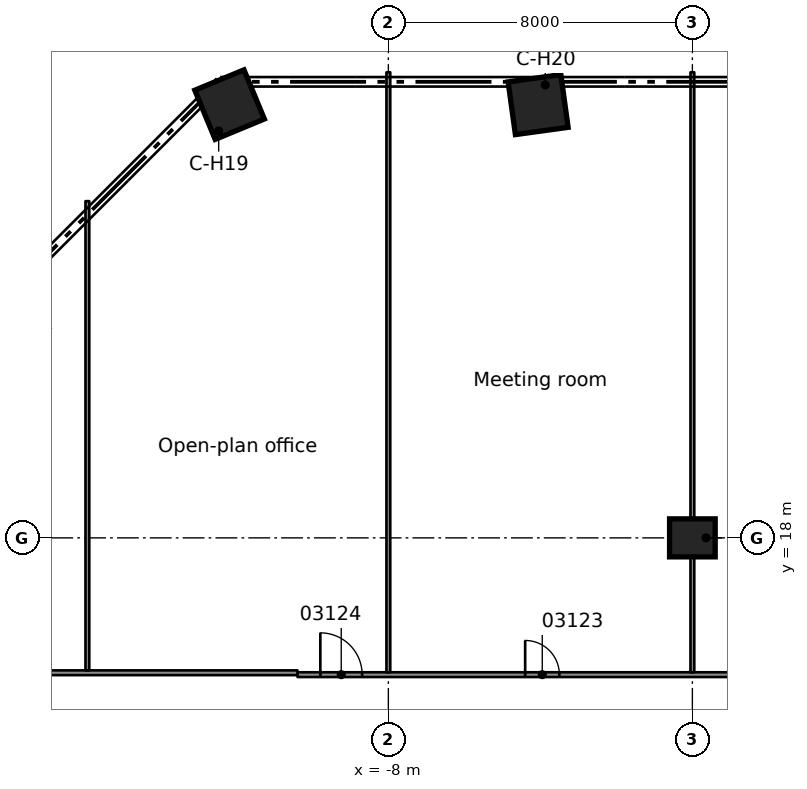
"""IFC4 building model, lengths in metres.
Left out: names, types, materials, properties, quantities, classifications, styles, units other than length and angle.
Written with IfcOpenShell. Run it as: python <this file> out.ifc"""

import sys

from ifc_helpers import new_model, si_unit, direction, frame, frame_2d, origin, origin_2d, place, context, subcontext, project, spatial, rectangle, extrude, element, fill, save


model = new_model("IFC4")
c1 = context("Model", 3, precision=1e-05, world=origin(), true_north=direction((0.0, 1.0)))
c2 = subcontext(c1, "Body", "Model", "MODEL_VIEW")
j1 = project(units=[si_unit("LENGTHUNIT", "METRE"), si_unit("PLANEANGLEUNIT", "RADIAN")], contexts=[c1])
p1 = place(None, origin())
s1 = spatial("IfcSite", under=j1, at=p1, CompositionType="ELEMENT")
p2 = place(p1, origin())
s2 = spatial("IfcBuilding", under=s1, at=p2, CompositionType="ELEMENT")
p3 = place(p2, frame((0.0, 0.0, 15.5)))
s3 = spatial("IfcBuildingStorey", under=s2, at=p3, CompositionType="ELEMENT", Elevation=15.5)
for number, where, z_axis, x_axis in (
    (1, (-12.178, 29.4, 0.0), (0.0, 0.0, 1.0), (-0.383, 0.924, 0.0)),
    (2, (-4.059, 29.4, 0.0), (0.0, 0.0, 1.0), (-0.137, 0.991, 0.0)),
):
    element("IfcColumn", number, at=place(p3, frame(where, z_axis=z_axis, x_axis=x_axis)), inside=s3, PredefinedType="COLUMN", context=c2, shape_type="SweptSolid", body=[
        extrude(rectangle(XDim=1.4, YDim=1.4, at=origin_2d()), origin(), (0.0, 0.0, 1.0), 5.0),
    ])
p4 = place(p3, frame((0.0, 18.0, 0.0), z_axis=(0.0, 0.0, 1.0), x_axis=(1.0, 0.0, 0.0)))
e3 = element("IfcColumn", 3, at=p4, inside=s3, PredefinedType="COLUMN", context=c2, shape_type="SweptSolid", body=[
    extrude(rectangle(XDim=1.2, YDim=1.0, at=origin_2d()), origin(), (0.0, 0.0, 1.0), 5.0),
])
p5 = place(p3, frame((-10.39, 14.401, 0.0), z_axis=(0.0, 0.0, 1.0), x_axis=(1.0, 0.0, 0.0)))
e4 = element("IfcWall", 4, at=p5, inside=s3, PredefinedType="PARTITIONING", context=c2, shape_type="SweptSolid", body=[
    extrude(rectangle(XDim=20.781, YDim=0.125, at=frame_2d((10.391, 0.0))), origin(), (0.0, 0.0, 1.0), 4.58),
])
p6 = place(p5, frame((18.99, 0.0, 0.0)))
e5 = element("IfcOpeningElement", 5, at=p6, cuts=e4, PredefinedType="OPENING", context=c2, shape_type="SweptSolid", body=[
    extrude(rectangle(XDim=1.1, YDim=2.1, at=frame_2d((0.55, 1.05))), frame((0.0, 0.073, 0.0), z_axis=(0.0, -1.0, 0.0), x_axis=(1.0, 0.0, 0.0)), (0.0, 0.0, 1.0), 0.145),
])
p7 = place(p5, frame((13.99, 0.0, 0.0)))
e6 = element("IfcOpeningElement", 6, at=p7, cuts=e4, PredefinedType="OPENING", context=c2, shape_type="SweptSolid", body=[
    extrude(rectangle(XDim=0.9, YDim=2.1, at=frame_2d((0.45, 1.05))), frame((0.0, 0.073, 0.0), z_axis=(0.0, -1.0, 0.0), x_axis=(1.0, 0.0, 0.0)), (0.0, 0.0, 1.0), 0.145),
])
p8 = place(p5, frame((5.99, 0.0, 0.0)))
e7 = element("IfcOpeningElement", 7, at=p8, cuts=e4, PredefinedType="OPENING", context=c2, shape_type="SweptSolid", body=[
    extrude(rectangle(XDim=0.9, YDim=2.1, at=frame_2d((0.45, 1.05))), frame((0.0, 0.073, 0.0), z_axis=(0.0, -1.0, 0.0), x_axis=(1.0, 0.0, 0.0)), (0.0, 0.0, 1.0), 0.145),
])
p9 = place(p5, frame((0.6, 0.0, 0.0)))
e8 = element("IfcOpeningElement", 8, at=p9, cuts=e4, PredefinedType="OPENING", context=c2, shape_type="SweptSolid", body=[
    extrude(rectangle(XDim=1.1, YDim=2.1, at=frame_2d((0.55, 1.05))), frame((0.0, 0.073, 0.0), z_axis=(0.0, -1.0, 0.0), x_axis=(1.0, 0.0, 0.0)), (0.0, 0.0, 1.0), 0.145),
])
p10 = place(p3, frame((-21.387, 14.451, 0.0), z_axis=(0.0, 0.0, 1.0), x_axis=(1.0, 0.0, 0.0)))
e9 = element("IfcWall", 9, at=p10, inside=s3, PredefinedType="PARTITIONING", context=c2, shape_type="SweptSolid", body=[
    extrude(rectangle(XDim=10.996, YDim=0.125, at=frame_2d((5.498, 0.0))), origin(), (0.0, 0.0, 1.0), 4.58),
])
p11 = place(p10, frame((2.288, 0.0, 0.0)))
e10 = element("IfcOpeningElement", 10, at=p11, cuts=e9, PredefinedType="OPENING", context=c2, shape_type="SweptSolid", body=[
    extrude(rectangle(XDim=0.9, YDim=2.1, at=frame_2d((0.45, 1.05))), frame((0.0, 0.073, 0.0), z_axis=(0.0, -1.0, 0.0), x_axis=(1.0, 0.0, 0.0)), (0.0, 0.0, 1.0), 0.145),
])
for number, where, z_axis, x_axis in (
    (11, (0.0, 14.463, 0.0), (0.0, 0.0, 1.0), (0.0, 1.0, 0.0)),
    (12, (-8.0, 14.463, 0.0), (0.0, 0.0, 1.0), (0.0, 1.0, 0.0)),
):
    element("IfcWall", number, at=place(p3, frame(where, z_axis=z_axis, x_axis=x_axis)), inside=s3, PredefinedType="PARTITIONING", context=c2, shape_type="SweptSolid", body=[
        extrude(rectangle(XDim=15.787, YDim=0.1, at=frame_2d((7.894, 0.0))), origin(), (0.0, 0.0, 1.0), 4.58),
    ])
p12 = place(p3, frame((-15.92, 14.514, 0.0), z_axis=(0.0, 0.0, 1.0), x_axis=(0.0, 1.0, 0.0)))
e13 = element("IfcWall", 13, at=p12, inside=s3, PredefinedType="PARTITIONING", context=c2, shape_type="SweptSolid", body=[
    extrude(rectangle(XDim=12.346, YDim=0.1, at=frame_2d((6.173, 0.0))), origin(), (0.0, 0.0, 1.0), 4.58),
])
p13 = place(p8, origin())
e14 = element("IfcDoor", 14, at=p13, inside=s3, OperationType="SINGLE_SWING_LEFT", PredefinedType="DOOR", context=c2, shape_type="SweptSolid", body=[
    extrude(rectangle(XDim=0.9, YDim=2.1, at=frame_2d((0.45, 1.05))), frame((0.0, 0.025, 0.0), z_axis=(0.0, -1.0, 0.0), x_axis=(1.0, 0.0, 0.0)), (0.0, 0.0, 1.0), 0.05),
])
fill(e7, e14)
p14 = place(p9, origin())
e15 = element("IfcDoor", 15, at=p14, inside=s3, OperationType="SINGLE_SWING_LEFT", PredefinedType="DOOR", context=c2, shape_type="SweptSolid", body=[
    extrude(rectangle(XDim=1.1, YDim=2.1, at=frame_2d((0.55, 1.05))), frame((0.0, 0.025, 0.0), z_axis=(0.0, -1.0, 0.0), x_axis=(1.0, 0.0, 0.0)), (0.0, 0.0, 1.0), 0.05),
])
fill(e8, e15)
save(model, sys.argv[1])
